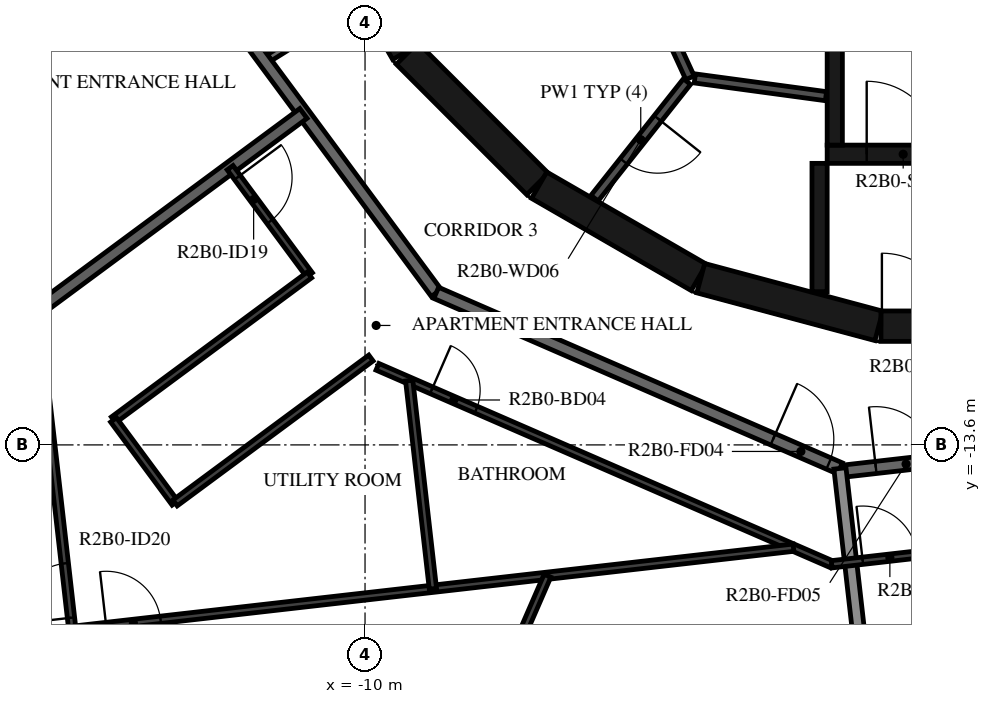
"""IFC4 building model, lengths in metres.
Left out: names, types, materials, properties, quantities, classifications, styles, units other than length and angle.
Written with IfcOpenShell. Run it as: python <this file> out.ifc"""

import sys

from ifc_helpers import new_model, si_unit, direction, frame, frame_2d, origin, place, context, subcontext, project, spatial, rectangle, extrude, element, fill, save


model = new_model("IFC4")
c1 = context("Model", 3, precision=1e-05, world=origin(), true_north=direction((0.0, 1.0)))
c2 = subcontext(c1, "Body", "Model", "MODEL_VIEW")
j1 = project(units=[si_unit("LENGTHUNIT", "METRE"), si_unit("PLANEANGLEUNIT", "RADIAN")], contexts=[c1])
p1 = place(None, origin())
s1 = spatial("IfcSite", under=j1, at=p1, CompositionType="ELEMENT")
p2 = place(p1, origin())
s2 = spatial("IfcBuilding", under=s1, at=p2, CompositionType="ELEMENT")
p3 = place(p2, frame((0.0, 0.0, 90.7)))
s3 = spatial("IfcBuildingStorey", under=s2, at=p3, CompositionType="ELEMENT", Elevation=90.7)
p4 = place(p3, frame((-10.845, -4.51, 0.0), z_axis=(0.0, 0.0, 1.0), x_axis=(0.500087131594, -0.865975092491, 0.0)))
e1 = element("IfcWall", 1, at=p4, inside=s3, PredefinedType="SHEAR", context=c2, shape_type="SweptSolid", body=[
    extrude(rectangle(XDim=3.033, YDim=0.5, at=frame_2d((1.516, 0.0))), origin(), (0.0, 0.0, 1.0), 3.12),
])
p5 = place(p3, frame((-9.308, -7.164, 0.0), z_axis=(0.0, 0.0, 1.0), x_axis=(0.707106781187, -0.707106781187, 0.0)))
e2 = element("IfcWall", 2, at=p5, inside=s3, PredefinedType="SHEAR", context=c2, shape_type="SweptSolid", body=[
    extrude(rectangle(XDim=3.032, YDim=0.5, at=frame_2d((1.516, 0.0))), origin(), (0.0, 0.0, 1.0), 3.12),
])
for number, where, z_axis, x_axis in (
    (3, (-7.137, -9.329, 0.0), (0.0, 0.0, 1.0), (0.866, -0.5, 0.0)),
    (4, (-4.479, -10.858, 0.0), (0.0, 0.0, 1.0), (0.966, -0.259, 0.0)),
):
    element("IfcWall", number, at=place(p3, frame(where, z_axis=z_axis, x_axis=x_axis)), inside=s3, PredefinedType="SHEAR", context=c2, shape_type="SweptSolid", body=[
        extrude(rectangle(XDim=3.033, YDim=0.5, at=frame_2d((1.516, 0.0))), origin(), (0.0, 0.0, 1.0), 3.12),
    ])
p6 = place(p3, frame((-1.516, -11.647, 0.0), z_axis=(0.0, 0.0, 1.0), x_axis=(1.0, 0.0, 0.0)))
e5 = element("IfcWall", 5, at=p6, inside=s3, PredefinedType="SHEAR", context=c2, shape_type="SweptSolid", body=[
    extrude(rectangle(XDim=3.033, YDim=0.5, at=frame_2d((1.516, 0.0))), origin(), (0.0, 0.0, 1.0), 3.12),
])
p7 = place(p6, frame((0.016, 0.0, 0.0)))
e6 = element("IfcOpeningElement", 6, at=p7, cuts=e5, PredefinedType="OPENING", context=c2, shape_type="SweptSolid", body=[
    extrude(rectangle(XDim=1.2, YDim=2.1, at=frame_2d((0.6, 1.05))), frame((0.0, 0.26, 0.0), z_axis=(0.0, -1.0, 0.0), x_axis=(1.0, 0.0, 0.0)), (0.0, 0.0, 1.0), 0.52),
])
p8 = place(p3, frame((-2.275, -8.67, 0.0), z_axis=(0.0, 0.0, 1.0), x_axis=(0.0, 1.0, 0.0)))
e7 = element("IfcWall", 7, at=p8, inside=s3, PredefinedType="SHEAR", context=c2, shape_type="SweptSolid", body=[
    extrude(rectangle(XDim=3.32, YDim=0.25, at=frame_2d((1.66, 0.0))), origin(), (0.0, 0.0, 1.0), 3.12),
])
p9 = place(p3, frame((-2.4, -8.82, 0.0), z_axis=(0.0, 0.0, 1.0), x_axis=(1.0, 0.0, 0.0)))
e8 = element("IfcWall", 8, at=p9, inside=s3, PredefinedType="SHEAR", context=c2, shape_type="SweptSolid", body=[
    extrude(rectangle(XDim=2.5, YDim=0.3, at=frame_2d((1.25, 0.0))), origin(), (0.0, 0.0, 1.0), 3.12),
])
p10 = place(p9, frame((0.65, 0.0, 0.0)))
e9 = element("IfcOpeningElement", 9, at=p10, cuts=e8, PredefinedType="OPENING", context=c2, shape_type="SweptSolid", body=[
    extrude(rectangle(XDim=1.2, YDim=2.1, at=frame_2d((0.6, 1.05))), frame((0.0, 0.16, 0.0), z_axis=(0.0, -1.0, 0.0), x_axis=(1.0, 0.0, 0.0)), (0.0, 0.0, 1.0), 0.32),
])
p11 = place(p3, frame((-2.525, -8.97, 0.0), z_axis=(0.0, 0.0, 1.0), x_axis=(0.0, -1.0, 0.0)))
e10 = element("IfcWall", 10, at=p11, inside=s3, PredefinedType="SHEAR", context=c2, shape_type="SweptSolid", body=[
    extrude(rectangle(XDim=2.11, YDim=0.25, at=frame_2d((1.055, 0.0))), origin(), (0.0, 0.0, 1.0), 3.12),
])
p12 = place(p3, frame((-5.795, -5.086, 0.0), z_axis=(0.0, 0.0, 1.0), x_axis=(0.417887867606, -0.908498613157, 0.0)))
e11 = element("IfcWall", 11, at=p12, inside=s3, PredefinedType="PARTITIONING", context=c2, shape_type="SweptSolid", body=[
    extrude(rectangle(XDim=2.726, YDim=0.15, at=frame_2d((1.363, 0.0))), origin(), (0.0, 0.0, 1.0), 3.12),
])
p13 = place(p12, frame((0.913, 0.0, 0.0)))
e12 = element("IfcOpeningElement", 12, at=p13, cuts=e11, PredefinedType="OPENING", context=c2, shape_type="SweptSolid", body=[
    extrude(rectangle(XDim=0.9, YDim=2.1, at=frame_2d((0.45, 1.05))), frame((0.0, 0.085, 0.0), z_axis=(0.0, -1.0, 0.0), x_axis=(1.0, 0.0, 0.0)), (0.0, 0.0, 1.0), 0.17),
])
p14 = place(p3, frame((-4.706, -7.625, 0.0), z_axis=(0.0, 0.0, 1.0), x_axis=(-0.621392599334, -0.783499353856, 0.0)))
e13 = element("IfcWall", 13, at=p14, inside=s3, PredefinedType="PARTITIONING", context=c2, shape_type="SweptSolid", body=[
    extrude(rectangle(XDim=2.447, YDim=0.15, at=frame_2d((1.224, 0.0))), origin(), (0.0, 0.0, 1.0), 3.12),
])
p15 = place(p14, frame((0.774, 0.0, 0.0)))
e14 = element("IfcOpeningElement", 14, at=p15, cuts=e13, PredefinedType="OPENING", context=c2, shape_type="SweptSolid", body=[
    extrude(rectangle(XDim=0.9, YDim=2.1, at=frame_2d((0.45, 1.05))), frame((0.0, 0.085, 0.0), z_axis=(0.0, -1.0, 0.0), x_axis=(1.0, 0.0, 0.0)), (0.0, 0.0, 1.0), 0.17),
])
p16 = place(p3, frame((-2.42, -7.865, 0.0), z_axis=(0.0, 0.0, 1.0), x_axis=(-0.990972299108, 0.134066783362, 0.0)))
e15 = element("IfcWall", 15, at=p16, inside=s3, PredefinedType="PARTITIONING", context=c2, shape_type="SweptSolid", body=[
    extrude(rectangle(XDim=2.176, YDim=0.15, at=frame_2d((1.088, 0.0))), origin(), (0.0, 0.0, 1.0), 3.12),
])
p17 = place(p3, frame((-11.654, -7.282, 0.0), z_axis=(0.0, 0.0, 1.0), x_axis=(0.848117698675, 0.529807860638, 0.0)))
e16 = element("IfcWall", 16, at=p17, inside=s3, PredefinedType="PARTITIONING", context=c2, shape_type="SweptSolid", body=[
    extrude(rectangle(XDim=1.838, YDim=0.12, at=frame_2d((0.919, 0.0))), origin(), (0.0, 0.0, 1.0), 3.12),
])
p18 = place(p17, frame((0.115, 0.0, 0.0)))
e17 = element("IfcOpeningElement", 17, at=p18, cuts=e16, PredefinedType="OPENING", context=c2, shape_type="SweptSolid", body=[
    extrude(rectangle(XDim=1.2, YDim=2.1, at=frame_2d((0.6, 1.05))), frame((0.0, 0.07, 0.0), z_axis=(0.0, -1.0, 0.0), x_axis=(1.0, 0.0, 0.0)), (0.0, 0.0, 1.0), 0.14),
])
p19 = place(p3, frame((-13.196, -5.198, 0.0), z_axis=(0.0, 0.0, 1.0), x_axis=(0.594805187394, -0.803869883159, 0.0)))
e18 = element("IfcWall", 18, at=p19, inside=s3, PredefinedType="STANDARD", context=c2, shape_type="SweptSolid", body=[
    extrude(rectangle(XDim=7.342, YDim=0.2, at=frame_2d((3.671, 0.0))), origin(), (0.0, 0.0, 1.0), 3.12),
])
p20 = place(p3, frame((-8.829, -11.1, 0.0), z_axis=(0.0, 0.0, 1.0), x_axis=(0.917063622491, -0.398740908742, 0.0)))
e19 = element("IfcWall", 19, at=p20, inside=s3, PredefinedType="STANDARD", context=c2, shape_type="SweptSolid", body=[
    extrude(rectangle(XDim=7.24, YDim=0.2, at=frame_2d((3.62, 0.0))), origin(), (0.0, 0.0, 1.0), 3.12),
])
p21 = place(p20, frame((6.04, 0.0, 0.0)))
e20 = element("IfcOpeningElement", 20, at=p21, cuts=e19, PredefinedType="OPENING", context=c2, shape_type="SweptSolid", body=[
    extrude(rectangle(XDim=1.0, YDim=2.1, at=frame_2d((0.5, 1.05))), frame((0.0, 0.11, 0.0), z_axis=(0.0, -1.0, 0.0), x_axis=(1.0, 0.0, 0.0)), (0.0, 0.0, 1.0), 0.22),
])
p22 = place(p3, frame((-2.096, -14.028, 0.0), z_axis=(0.0, 0.0, 1.0), x_axis=(0.993569170114, 0.113226782163, 0.0)))
e21 = element("IfcWall", 21, at=p22, inside=s3, PredefinedType="STANDARD", context=c2, shape_type="SweptSolid", body=[
    extrude(rectangle(XDim=7.342, YDim=0.2, at=frame_2d((3.671, 0.0))), origin(), (0.0, 0.0, 1.0), 3.12),
])
p23 = place(p22, frame((0.5, 0.0, 0.0)))
e22 = element("IfcOpeningElement", 22, at=p23, cuts=e21, PredefinedType="OPENING", context=c2, shape_type="SweptSolid", body=[
    extrude(rectangle(XDim=1.0, YDim=2.1, at=frame_2d((0.5, 1.05))), frame((0.0, 0.11, 0.0), z_axis=(0.0, -1.0, 0.0), x_axis=(1.0, 0.0, 0.0)), (0.0, 0.0, 1.0), 0.22),
])
p24 = place(p3, frame((-16.649, -12.32, 0.0), z_axis=(0.0, 0.0, 1.0), x_axis=(0.803869204071, 0.594806105169, 0.0)))
e23 = element("IfcWall", 23, at=p24, inside=s3, PredefinedType="STANDARD", context=c2, shape_type="SweptSolid", body=[
    extrude(rectangle(XDim=7.011, YDim=0.2, at=frame_2d((3.506, 0.0))), origin(), (0.0, 0.0, 1.0), 3.12),
])
p25 = place(p3, frame((-1.555, -19.559, 0.0), z_axis=(0.0, 0.0, 1.0), x_axis=(-0.113221250863, 0.993569800443, 0.0)))
e24 = element("IfcWall", 24, at=p25, inside=s3, PredefinedType="STANDARD", context=c2, shape_type="SweptSolid", body=[
    extrude(rectangle(XDim=5.609, YDim=0.2, at=frame_2d((2.804, 0.0))), origin(), (0.0, 0.0, 1.0), 2.73),
])
p26 = place(p3, frame((-12.219, -9.041, 0.0), z_axis=(0.0, 0.0, 1.0), x_axis=(0.59482286703, -0.803856801214, 0.0)))
e25 = element("IfcWall", 25, at=p26, inside=s3, PredefinedType="PARTITIONING", context=c2, shape_type="SweptSolid", body=[
    extrude(rectangle(XDim=2.193, YDim=0.12, at=frame_2d((1.097, 0.0))), origin(), (0.0, 0.0, 1.0), 3.12),
])
p27 = place(p26, frame((0.2, 0.0, 0.0)))
e26 = element("IfcOpeningElement", 26, at=p27, cuts=e25, PredefinedType="OPENING", context=c2, shape_type="SweptSolid", body=[
    extrude(rectangle(XDim=0.9, YDim=2.1, at=frame_2d((0.45, 1.05))), frame((0.0, 0.07, 0.0), z_axis=(0.0, -1.0, 0.0), x_axis=(1.0, 0.0, 0.0)), (0.0, 0.0, 1.0), 0.14),
])
p28 = place(p3, frame((-10.914, -10.804, 0.0), z_axis=(0.0, 0.0, 1.0), x_axis=(-0.803864616889, -0.594812304609, 0.0)))
e27 = element("IfcWall", 27, at=p28, inside=s3, PredefinedType="PARTITIONING", context=c2, shape_type="SweptSolid", body=[
    extrude(rectangle(XDim=4.008, YDim=0.12, at=frame_2d((2.004, 0.0))), origin(), (0.0, 0.0, 1.0), 3.12),
])
p29 = place(p3, frame((-14.136, -13.188, 0.0), z_axis=(0.0, 0.0, 1.0), x_axis=(0.594863421241, -0.803826791087, 0.0)))
e28 = element("IfcWall", 28, at=p29, inside=s3, PredefinedType="PARTITIONING", context=c2, shape_type="SweptSolid", body=[
    extrude(rectangle(XDim=1.7, YDim=0.12, at=frame_2d((0.85, 0.0))), origin(), (0.0, 0.0, 1.0), 3.12),
])
p30 = place(p3, frame((-13.125, -14.555, 0.0), z_axis=(0.0, 0.0, 1.0), x_axis=(0.80389374229, 0.594772940799, 0.0)))
e29 = element("IfcWall", 29, at=p30, inside=s3, PredefinedType="PARTITIONING", context=c2, shape_type="SweptSolid", body=[
    extrude(rectangle(XDim=4.008, YDim=0.12, at=frame_2d((2.004, 0.0))), origin(), (0.0, 0.0, 1.0), 3.12),
])
p31 = place(p3, frame((-9.796, -12.315, 0.0), z_axis=(0.0, 0.0, 1.0), x_axis=(0.917059572812, -0.398750222463, 0.0)))
e30 = element("IfcWall", 30, at=p31, inside=s3, PredefinedType="PARTITIONING", context=c2, shape_type="SweptSolid", body=[
    extrude(rectangle(XDim=8.146, YDim=0.12, at=frame_2d((4.073, 0.0))), origin(), (0.0, 0.0, 1.0), 3.12),
])
p32 = place(p31, frame((0.969, 0.0, 0.0)))
e31 = element("IfcOpeningElement", 31, at=p32, cuts=e30, PredefinedType="OPENING", context=c2, shape_type="SweptSolid", body=[
    extrude(rectangle(XDim=0.8, YDim=2.1, at=frame_2d((0.4, 1.05))), frame((0.0, 0.07, 0.0), z_axis=(0.0, -1.0, 0.0), x_axis=(1.0, 0.0, 0.0)), (0.0, 0.0, 1.0), 0.14),
])
p33 = place(p3, frame((-2.326, -15.563, 0.0), z_axis=(0.0, 0.0, 1.0), x_axis=(0.993575068384, 0.113175012641, 0.0)))
e32 = element("IfcWall", 32, at=p33, inside=s3, PredefinedType="PARTITIONING", context=c2, shape_type="SweptSolid", body=[
    extrude(rectangle(XDim=3.799, YDim=0.12, at=frame_2d((1.899, 0.0))), origin(), (0.0, 0.0, 1.0), 3.12),
])
p34 = place(p33, frame((0.513, 0.0, 0.0)))
e33 = element("IfcOpeningElement", 33, at=p34, cuts=e32, PredefinedType="OPENING", context=c2, shape_type="SweptSolid", body=[
    extrude(rectangle(XDim=0.9, YDim=2.1, at=frame_2d((0.45, 1.05))), frame((0.0, 0.07, 0.0), z_axis=(0.0, -1.0, 0.0), x_axis=(1.0, 0.0, 0.0)), (0.0, 0.0, 1.0), 0.14),
])
p35 = place(p3, frame((-14.813, -16.641, 0.0), z_axis=(0.0, 0.0, 1.0), x_axis=(-0.113210971478, 0.993570971767, 0.0)))
e34 = element("IfcWall", 34, at=p35, inside=s3, PredefinedType="PARTITIONING", context=c2, shape_type="SweptSolid", body=[
    extrude(rectangle(XDim=5.273, YDim=0.12, at=frame_2d((2.636, 0.0))), origin(), (0.0, 0.0, 1.0), 3.12),
])
p36 = place(p35, frame((0.2, 0.0, 0.0)))
e35 = element("IfcOpeningElement", 35, at=p36, cuts=e34, PredefinedType="OPENING", context=c2, shape_type="SweptSolid", body=[
    extrude(rectangle(XDim=0.9, YDim=2.1, at=frame_2d((0.45, 1.05))), frame((0.0, 0.07, 0.0), z_axis=(0.0, -1.0, 0.0), x_axis=(1.0, 0.0, 0.0)), (0.0, 0.0, 1.0), 0.14),
])
p37 = place(p3, frame((-17.437, -16.94, 0.0), z_axis=(0.0, 0.0, 1.0), x_axis=(0.993573314119, 0.113190412448, 0.0)))
e36 = element("IfcWall", 36, at=p37, inside=s3, PredefinedType="PARTITIONING", context=c2, shape_type="SweptSolid", body=[
    extrude(rectangle(XDim=14.576, YDim=0.12, at=frame_2d((7.288, 0.0))), origin(), (0.0, 0.0, 1.0), 3.12),
])
p38 = place(p37, frame((3.201, 0.0, 0.0)))
e37 = element("IfcOpeningElement", 37, at=p38, cuts=e36, PredefinedType="OPENING", context=c2, shape_type="SweptSolid", body=[
    extrude(rectangle(XDim=0.9, YDim=2.1, at=frame_2d((0.45, 1.05))), frame((0.0, 0.07, 0.0), z_axis=(0.0, -1.0, 0.0), x_axis=(1.0, 0.0, 0.0)), (0.0, 0.0, 1.0), 0.14),
])
p39 = place(p37, frame((0.2, 0.0, 0.0)))
e38 = element("IfcOpeningElement", 38, at=p39, cuts=e36, PredefinedType="OPENING", context=c2, shape_type="SweptSolid", body=[
    extrude(rectangle(XDim=0.9, YDim=2.1, at=frame_2d((0.45, 1.05))), frame((0.0, 0.07, 0.0), z_axis=(0.0, -1.0, 0.0), x_axis=(1.0, 0.0, 0.0)), (0.0, 0.0, 1.0), 0.14),
])
p40 = place(p3, frame((-8.884, -15.966, 0.0), z_axis=(0.0, 0.0, 1.0), x_axis=(-0.113230836929, 0.993568708026, 0.0)))
e39 = element("IfcWall", 39, at=p40, inside=s3, PredefinedType="PARTITIONING", context=c2, shape_type="SweptSolid", body=[
    extrude(rectangle(XDim=3.446, YDim=0.12, at=frame_2d((1.723, 0.0))), origin(), (0.0, 0.0, 1.0), 3.12),
])
p41 = place(p3, frame((-9.026, -20.41, 0.0), z_axis=(0.0, 0.0, 1.0), x_axis=(0.398750711167, 0.917059360316, 0.0)))
e40 = element("IfcWall", 40, at=p41, inside=s3, PredefinedType="PARTITIONING", context=c2, shape_type="SweptSolid", body=[
    extrude(rectangle(XDim=5.081, YDim=0.12, at=frame_2d((2.54, 0.0))), origin(), (0.0, 0.0, 1.0), 3.12),
])
p42 = place(p41, frame((0.4, 0.0, 0.0)))
e41 = element("IfcOpeningElement", 41, at=p42, cuts=e40, PredefinedType="OPENING", context=c2, shape_type="SweptSolid", body=[
    extrude(rectangle(XDim=0.9, YDim=2.1, at=frame_2d((0.45, 1.05))), frame((0.0, 0.07, 0.0), z_axis=(0.0, -1.0, 0.0), x_axis=(1.0, 0.0, 0.0)), (0.0, 0.0, 1.0), 0.14),
])
p43 = place(p10, origin())
e42 = element("IfcDoor", 42, at=p43, inside=s3, OperationType="SINGLE_SWING_LEFT", PredefinedType="DOOR", context=c2, shape_type="SweptSolid", body=[
    extrude(rectangle(XDim=1.2, YDim=2.1, at=frame_2d((0.6, 1.05))), frame((0.0, 0.025, 0.0), z_axis=(0.0, -1.0, 0.0), x_axis=(1.0, 0.0, 0.0)), (0.0, 0.0, 1.0), 0.05),
])
fill(e9, e42)
p44 = place(p7, origin())
e43 = element("IfcDoor", 43, at=p44, inside=s3, OperationType="SINGLE_SWING_RIGHT", PredefinedType="DOOR", context=c2, shape_type="SweptSolid", body=[
    extrude(rectangle(XDim=1.2, YDim=2.1, at=frame_2d((0.6, 1.05))), frame((0.0, 0.025, 0.0), z_axis=(0.0, -1.0, 0.0), x_axis=(1.0, 0.0, 0.0)), (0.0, 0.0, 1.0), 0.05),
])
fill(e6, e43)
p45 = place(p15, origin())
e44 = element("IfcDoor", 44, at=p45, inside=s3, OperationType="SINGLE_SWING_LEFT", PredefinedType="DOOR", context=c2, shape_type="SweptSolid", body=[
    extrude(rectangle(XDim=0.9, YDim=2.1, at=frame_2d((0.45, 1.05))), frame((0.0, 0.025, 0.0), z_axis=(0.0, -1.0, 0.0), x_axis=(1.0, 0.0, 0.0)), (0.0, 0.0, 1.0), 0.05),
])
fill(e14, e44)
p46 = place(p21, origin())
e45 = element("IfcDoor", 45, at=p46, inside=s3, OperationType="SINGLE_SWING_LEFT", PredefinedType="DOOR", context=c2, shape_type="SweptSolid", body=[
    extrude(rectangle(XDim=1.0, YDim=2.1, at=frame_2d((0.5, 1.05))), frame((0.0, 0.025, 0.0), z_axis=(0.0, -1.0, 0.0), x_axis=(1.0, 0.0, 0.0)), (0.0, 0.0, 1.0), 0.05),
])
fill(e20, e45)
p47 = place(p27, origin())
e46 = element("IfcDoor", 46, at=p47, inside=s3, OperationType="SINGLE_SWING_LEFT", PredefinedType="DOOR", context=c2, shape_type="SweptSolid", body=[
    extrude(rectangle(XDim=0.9, YDim=2.1, at=frame_2d((0.45, 1.05))), frame((0.0, 0.025, 0.0), z_axis=(0.0, -1.0, 0.0), x_axis=(1.0, 0.0, 0.0)), (0.0, 0.0, 1.0), 0.05),
])
fill(e26, e46)
p48 = place(p32, origin())
e47 = element("IfcDoor", 47, at=p48, inside=s3, OperationType="SINGLE_SWING_LEFT", PredefinedType="DOOR", context=c2, shape_type="SweptSolid", body=[
    extrude(rectangle(XDim=0.8, YDim=2.1, at=frame_2d((0.4, 1.05))), frame((0.0, 0.025, 0.0), z_axis=(0.0, -1.0, 0.0), x_axis=(1.0, 0.0, 0.0)), (0.0, 0.0, 1.0), 0.05),
])
fill(e31, e47)
p49 = place(p36, origin())
e48 = element("IfcDoor", 48, at=p49, inside=s3, OperationType="SINGLE_SWING_LEFT", PredefinedType="DOOR", context=c2, shape_type="SweptSolid", body=[
    extrude(rectangle(XDim=0.9, YDim=2.1, at=frame_2d((0.45, 1.05))), frame((0.0, 0.025, 0.0), z_axis=(0.0, -1.0, 0.0), x_axis=(1.0, 0.0, 0.0)), (0.0, 0.0, 1.0), 0.05),
])
fill(e35, e48)
p50 = place(p38, origin())
e49 = element("IfcDoor", 49, at=p50, inside=s3, OperationType="SINGLE_SWING_LEFT", PredefinedType="DOOR", context=c2, shape_type="SweptSolid", body=[
    extrude(rectangle(XDim=0.9, YDim=2.1, at=frame_2d((0.45, 1.05))), frame((0.0, 0.025, 0.0), z_axis=(0.0, -1.0, 0.0), x_axis=(1.0, 0.0, 0.0)), (0.0, 0.0, 1.0), 0.05),
])
fill(e37, e49)
p51 = place(p23, origin())
e50 = element("IfcDoor", 50, at=p51, inside=s3, OperationType="SINGLE_SWING_LEFT", PredefinedType="DOOR", context=c2, shape_type="SweptSolid", body=[
    extrude(rectangle(XDim=1.0, YDim=2.1, at=frame_2d((0.5, 1.05))), frame((0.0, 0.025, 0.0), z_axis=(0.0, -1.0, 0.0), x_axis=(1.0, 0.0, 0.0)), (0.0, 0.0, 1.0), 0.05),
])
fill(e22, e50)
p52 = place(p34, origin())
e51 = element("IfcDoor", 51, at=p52, inside=s3, OperationType="SINGLE_SWING_LEFT", PredefinedType="DOOR", context=c2, shape_type="SweptSolid", body=[
    extrude(rectangle(XDim=0.9, YDim=2.1, at=frame_2d((0.45, 1.05))), frame((0.0, 0.025, 0.0), z_axis=(0.0, -1.0, 0.0), x_axis=(1.0, 0.0, 0.0)), (0.0, 0.0, 1.0), 0.05),
])
fill(e33, e51)
p53 = place(p18, origin())
e52 = element("IfcDoor", 52, at=p53, inside=s3, OperationType="DOUBLE_DOOR_SINGLE_SWING", PredefinedType="DOOR", context=c2, shape_type="SweptSolid", body=[
    extrude(rectangle(XDim=1.2, YDim=2.1, at=frame_2d((0.6, 1.05))), frame((0.0, 0.025, 0.0), z_axis=(0.0, -1.0, 0.0), x_axis=(1.0, 0.0, 0.0)), (0.0, 0.0, 1.0), 0.05),
])
fill(e17, e52)
save(model, sys.argv[1])
